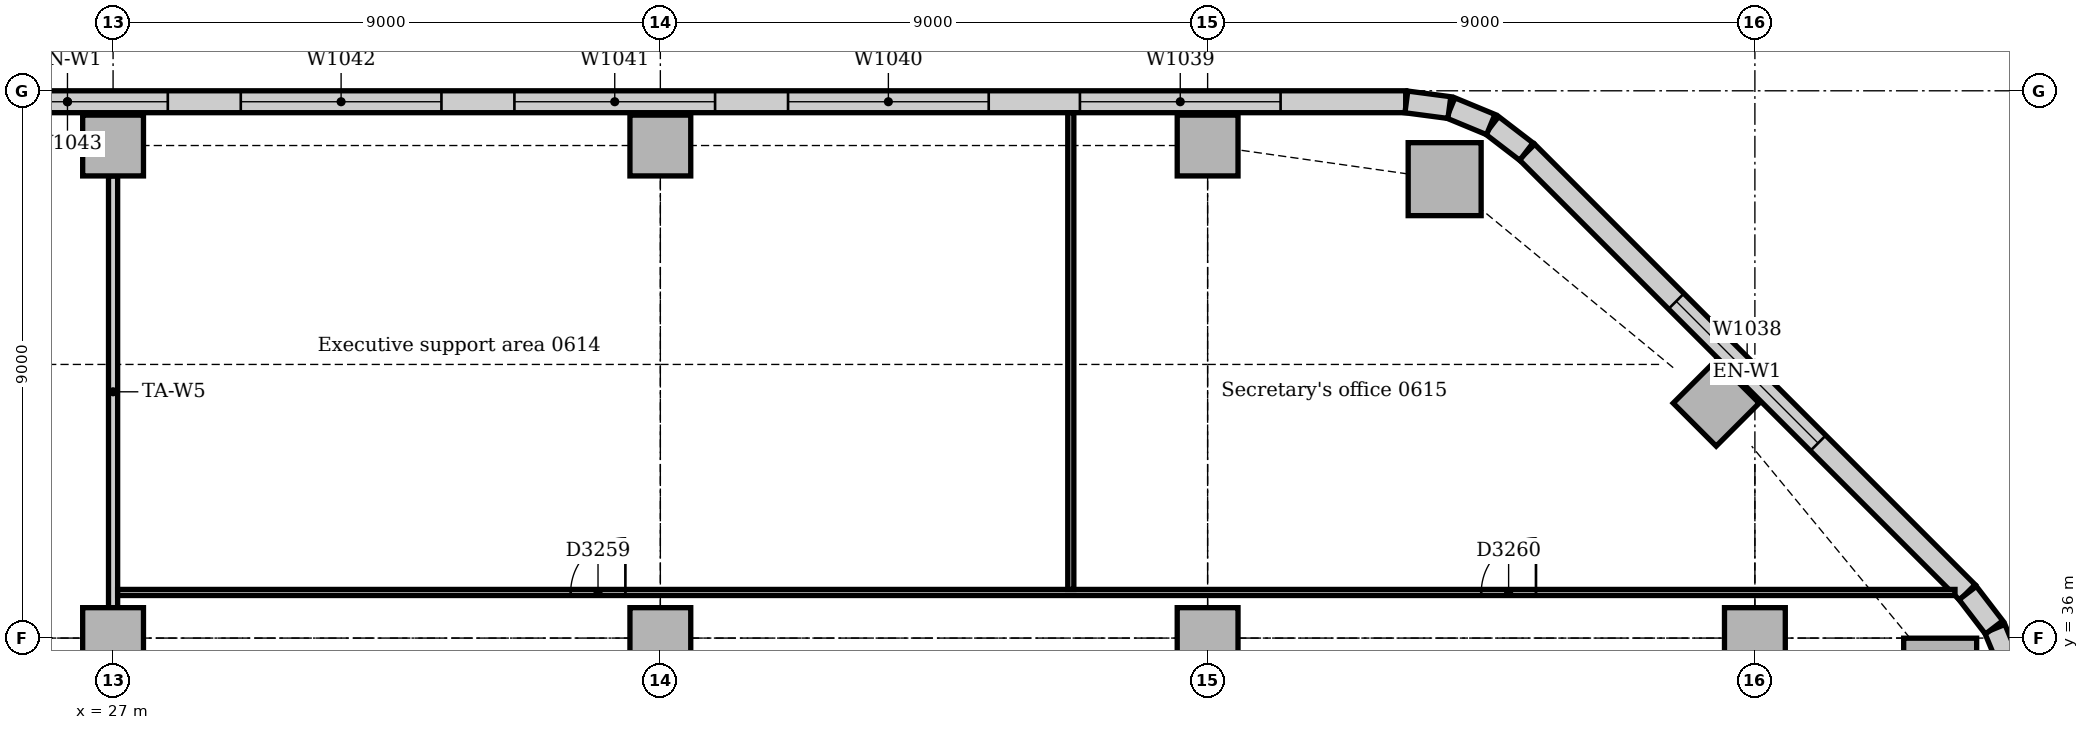
"""IFC4 building model, lengths in metres.
Left out: names, types, materials, properties, quantities, classifications, styles, units other than length and angle.
Written with IfcOpenShell. Run it as: python <this file> out.ifc"""

import sys

from ifc_helpers import new_model, si_unit, direction, frame, frame_2d, origin, origin_2d, place, context, subcontext, project, spatial, rectangle, extrude, element, fill, save


model = new_model("IFC4")
c1 = context("Model", 3, precision=1e-05, world=origin(), true_north=direction((0.0, 1.0)))
c2 = subcontext(c1, "Body", "Model", "MODEL_VIEW")
j1 = project(units=[si_unit("LENGTHUNIT", "METRE"), si_unit("PLANEANGLEUNIT", "RADIAN")], contexts=[c1])
p1 = place(None, origin())
s1 = spatial("IfcSite", under=j1, at=p1, CompositionType="ELEMENT")
p2 = place(p1, origin())
s2 = spatial("IfcBuilding", under=s1, at=p2, CompositionType="ELEMENT")
p3 = place(p2, frame((0.0, 0.0, 30.0)))
s3 = spatial("IfcBuildingStorey", under=s2, at=p3, CompositionType="ELEMENT", Elevation=30.0)
for number, where, z_axis, x_axis in (
    (1, (57.047, 35.398, 0.0), (0.0, 0.0, 1.0), (1.0, 0.0, 0.0)),
    (2, (48.898, 43.547, 0.0), (0.0, 0.0, 1.0), (1.0, 0.0, 0.0)),
):
    element("IfcColumn", number, at=place(p3, frame(where, z_axis=z_axis, x_axis=x_axis)), inside=s3, PredefinedType="COLUMN", context=c2, shape_type="SweptSolid", body=[
        extrude(rectangle(XDim=1.2, YDim=1.2, at=origin_2d()), origin(), (0.0, 0.0, 1.0), 3.85),
    ])
for number, where, z_axis, x_axis in (
    (3, (53.364, 39.864, 0.0), (0.0, 0.0, 1.0), (0.707, 0.707, 0.0)),
    (4, (27.0, 44.1, 0.0), (0.0, 0.0, 1.0), (1.0, 0.0, 0.0)),
    (5, (36.0, 44.1, 0.0), (0.0, 0.0, 1.0), (1.0, 0.0, 0.0)),
    (6, (45.0, 44.1, 0.0), (0.0, 0.0, 1.0), (1.0, 0.0, 0.0)),
    (7, (27.0, 36.0, 0.0), (0.0, 0.0, 1.0), (1.0, 0.0, 0.0)),
    (8, (36.0, 36.0, 0.0), (0.0, 0.0, 1.0), (1.0, 0.0, 0.0)),
    (9, (45.0, 36.0, 0.0), (0.0, 0.0, 1.0), (1.0, 0.0, 0.0)),
    (10, (54.0, 36.0, 0.0), (0.0, 0.0, 1.0), (1.0, 0.0, 0.0)),
):
    element("IfcColumn", number, at=place(p3, frame(where, z_axis=z_axis, x_axis=x_axis)), inside=s3, PredefinedType="COLUMN", context=c2, shape_type="SweptSolid", body=[
        extrude(rectangle(XDim=1.0, YDim=1.0, at=origin_2d()), origin(), (0.0, 0.0, 1.0), 3.85),
    ])
p4 = place(p3, frame((57.494, 36.751, 0.0), z_axis=(0.0, 0.0, 1.0), x_axis=(-0.707106781187, 0.707106781187, 0.0)))
e11 = element("IfcWall", 11, at=p4, inside=s3, PredefinedType="STANDARD", context=c2, shape_type="SweptSolid", body=[
    extrude(rectangle(XDim=10.243, YDim=0.36, at=frame_2d((5.121, 0.0))), origin(), (0.0, 0.0, 1.0), 3.85),
])
p5 = place(p4, frame((3.471, 0.0, 0.9)))
e12 = element("IfcOpeningElement", 12, at=p5, cuts=e11, PredefinedType="OPENING", context=c2, shape_type="SweptSolid", body=[
    extrude(rectangle(XDim=3.3, YDim=1.6, at=frame_2d((1.65, 0.8))), frame((0.0, 0.19, 0.0), z_axis=(0.0, -1.0, 0.0), x_axis=(1.0, 0.0, 0.0)), (0.0, 0.0, 1.0), 0.38),
])
p6 = place(p3, frame((48.257, 44.82, 0.0), z_axis=(0.0, 0.0, 1.0), x_axis=(-1.0, 0.0, 0.0)))
e13 = element("IfcWall", 13, at=p6, inside=s3, PredefinedType="STANDARD", context=c2, shape_type="SweptSolid", body=[
    extrude(rectangle(XDim=44.015, YDim=0.36, at=frame_2d((22.007, 0.0))), origin(), (0.0, 0.0, 1.0), 3.85),
])
p7 = place(p6, frame((2.057, 0.0, 0.9)))
e14 = element("IfcOpeningElement", 14, at=p7, cuts=e13, PredefinedType="OPENING", context=c2, shape_type="SweptSolid", body=[
    extrude(rectangle(XDim=3.3, YDim=1.6, at=frame_2d((1.65, 0.8))), frame((0.0, 0.19, 0.0), z_axis=(0.0, -1.0, 0.0), x_axis=(1.0, 0.0, 0.0)), (0.0, 0.0, 1.0), 0.38),
])
p8 = place(p6, frame((6.857, 0.0, 0.9)))
e15 = element("IfcOpeningElement", 15, at=p8, cuts=e13, PredefinedType="OPENING", context=c2, shape_type="SweptSolid", body=[
    extrude(rectangle(XDim=3.3, YDim=1.6, at=frame_2d((1.65, 0.8))), frame((0.0, 0.19, 0.0), z_axis=(0.0, -1.0, 0.0), x_axis=(1.0, 0.0, 0.0)), (0.0, 0.0, 1.0), 0.38),
])
p9 = place(p6, frame((11.357, 0.0, 0.9)))
e16 = element("IfcOpeningElement", 16, at=p9, cuts=e13, PredefinedType="OPENING", context=c2, shape_type="SweptSolid", body=[
    extrude(rectangle(XDim=3.3, YDim=1.6, at=frame_2d((1.65, 0.8))), frame((0.0, 0.19, 0.0), z_axis=(0.0, -1.0, 0.0), x_axis=(1.0, 0.0, 0.0)), (0.0, 0.0, 1.0), 0.38),
])
p10 = place(p6, frame((15.857, 0.0, 0.9)))
e17 = element("IfcOpeningElement", 17, at=p10, cuts=e13, PredefinedType="OPENING", context=c2, shape_type="SweptSolid", body=[
    extrude(rectangle(XDim=3.3, YDim=1.6, at=frame_2d((1.65, 0.8))), frame((0.0, 0.19, 0.0), z_axis=(0.0, -1.0, 0.0), x_axis=(1.0, 0.0, 0.0)), (0.0, 0.0, 1.0), 0.38),
])
p11 = place(p6, frame((20.357, 0.0, 0.9)))
e18 = element("IfcOpeningElement", 18, at=p11, cuts=e13, PredefinedType="OPENING", context=c2, shape_type="SweptSolid", body=[
    extrude(rectangle(XDim=3.3, YDim=1.6, at=frame_2d((1.65, 0.8))), frame((0.0, 0.19, 0.0), z_axis=(0.0, -1.0, 0.0), x_axis=(1.0, 0.0, 0.0)), (0.0, 0.0, 1.0), 0.38),
])
p12 = place(p6, frame((25.957, 0.0, 0.9)))
e19 = element("IfcOpeningElement", 19, at=p12, cuts=e13, PredefinedType="OPENING", context=c2, shape_type="SweptSolid", body=[
    extrude(rectangle(XDim=1.8, YDim=1.6, at=frame_2d((0.9, 0.8))), frame((0.0, 0.19, 0.0), z_axis=(0.0, -1.0, 0.0), x_axis=(1.0, 0.0, 0.0)), (0.0, 0.0, 1.0), 0.38),
])
p13 = place(p6, frame((29.357, 0.0, 0.9)))
e20 = element("IfcOpeningElement", 20, at=p13, cuts=e13, PredefinedType="OPENING", context=c2, shape_type="SweptSolid", body=[
    extrude(rectangle(XDim=3.3, YDim=1.6, at=frame_2d((1.65, 0.8))), frame((0.0, 0.19, 0.0), z_axis=(0.0, -1.0, 0.0), x_axis=(1.0, 0.0, 0.0)), (0.0, 0.0, 1.0), 0.38),
])
p14 = place(p6, frame((33.857, 0.0, 0.9)))
e21 = element("IfcOpeningElement", 21, at=p14, cuts=e13, PredefinedType="OPENING", context=c2, shape_type="SweptSolid", body=[
    extrude(rectangle(XDim=3.3, YDim=1.6, at=frame_2d((1.65, 0.8))), frame((0.0, 0.19, 0.0), z_axis=(0.0, -1.0, 0.0), x_axis=(1.0, 0.0, 0.0)), (0.0, 0.0, 1.0), 0.38),
])
p15 = place(p6, frame((38.357, 0.0, 0.9)))
e22 = element("IfcOpeningElement", 22, at=p15, cuts=e13, PredefinedType="OPENING", context=c2, shape_type="SweptSolid", body=[
    extrude(rectangle(XDim=3.3, YDim=1.6, at=frame_2d((1.65, 0.8))), frame((0.0, 0.19, 0.0), z_axis=(0.0, -1.0, 0.0), x_axis=(1.0, 0.0, 0.0)), (0.0, 0.0, 1.0), 0.38),
])
p16 = place(p3, frame((58.218, 35.497, 0.0), z_axis=(0.0, 0.0, 1.0), x_axis=(-0.382702709855, 0.923871547278, 0.0)))
e23 = element("IfcWall", 23, at=p16, inside=s3, PredefinedType="STANDARD", context=c2, shape_type="SweptSolid", body=[
    extrude(rectangle(XDim=0.713, YDim=0.36, at=frame_2d((0.356, 0.0))), origin(), (0.0, 0.0, 1.0), 3.85),
])
for number, where, z_axis, x_axis in (
    (24, (57.934, 36.175, 0.0), (0.0, 0.0, 1.0), (-0.609, 0.793, 0.0)),
    (25, (50.241, 44.0, 0.0), (0.0, 0.0, 1.0), (-0.793, 0.609, 0.0)),
):
    element("IfcWall", number, at=place(p3, frame(where, z_axis=z_axis, x_axis=x_axis)), inside=s3, PredefinedType="STANDARD", context=c2, shape_type="SweptSolid", body=[
        extrude(rectangle(XDim=0.713, YDim=0.36, at=frame_2d((0.357, 0.0))), origin(), (0.0, 0.0, 1.0), 3.85),
    ])
for number, where, z_axis, x_axis in (
    (26, (49.656, 44.445, 0.0), (0.0, 0.0, 1.0), (-0.924, 0.383, 0.0)),
    (27, (48.976, 44.724, 0.0), (0.0, 0.0, 1.0), (-0.991, 0.131, 0.0)),
):
    element("IfcWall", number, at=place(p3, frame(where, z_axis=z_axis, x_axis=x_axis)), inside=s3, PredefinedType="STANDARD", context=c2, shape_type="SweptSolid", body=[
        extrude(rectangle(XDim=0.713, YDim=0.36, at=frame_2d((0.356, 0.0))), origin(), (0.0, 0.0, 1.0), 3.85),
    ])
p17 = place(p3, frame((27.0, 36.5, 0.0), z_axis=(0.0, 0.0, 1.0), x_axis=(0.0, 1.0, 0.0)))
e28 = element("IfcWall", 28, at=p17, inside=s3, PredefinedType="PARTITIONING", context=c2, shape_type="SweptSolid", body=[
    extrude(rectangle(XDim=7.1, YDim=0.15, at=frame_2d((3.55, 0.0))), origin(), (0.0, 0.0, 1.0), 3.158),
])
p18 = place(p3, frame((27.075, 36.75, 0.0), z_axis=(0.0, 0.0, 1.0), x_axis=(1.0, 0.0, 0.0)))
e29 = element("IfcWall", 29, at=p18, inside=s3, PredefinedType="PARTITIONING", context=c2, shape_type="SweptSolid", body=[
    extrude(rectangle(XDim=30.216, YDim=0.1, at=frame_2d((15.108, 0.0))), origin(), (0.0, 0.0, 1.0), 3.85),
])
p19 = place(p18, frame((7.45, 0.0, 0.0)))
e30 = element("IfcOpeningElement", 30, at=p19, cuts=e29, PredefinedType="OPENING", context=c2, shape_type="SweptSolid", body=[
    extrude(rectangle(XDim=0.9, YDim=2.1, at=frame_2d((0.45, 1.05))), frame((0.0, 0.06, 0.0), z_axis=(0.0, -1.0, 0.0), x_axis=(1.0, 0.0, 0.0)), (0.0, 0.0, 1.0), 0.12),
])
p20 = place(p18, frame((22.425, 0.0, 0.0)))
e31 = element("IfcOpeningElement", 31, at=p20, cuts=e29, PredefinedType="OPENING", context=c2, shape_type="SweptSolid", body=[
    extrude(rectangle(XDim=0.9, YDim=2.1, at=frame_2d((0.45, 1.05))), frame((0.0, 0.06, 0.0), z_axis=(0.0, -1.0, 0.0), x_axis=(1.0, 0.0, 0.0)), (0.0, 0.0, 1.0), 0.12),
])
p21 = place(p3, frame((42.75, 36.8, 0.0), z_axis=(0.0, 0.0, 1.0), x_axis=(0.0, 1.0, 0.0)))
e32 = element("IfcWall", 32, at=p21, inside=s3, PredefinedType="PARTITIONING", context=c2, shape_type="SweptSolid", body=[
    extrude(rectangle(XDim=7.84, YDim=0.1, at=frame_2d((3.92, 0.0))), origin(), (0.0, 0.0, 1.0), 3.85),
])
p22 = place(p5, origin())
e33 = element("IfcWindow", 33, at=p22, inside=s3, PartitioningType="SINGLE_PANEL", PredefinedType="WINDOW", context=c2, shape_type="SweptSolid", body=[
    extrude(rectangle(XDim=3.3, YDim=1.6, at=frame_2d((1.65, 0.8))), frame((0.0, 0.13, 0.0), z_axis=(0.0, -1.0, 0.0), x_axis=(1.0, 0.0, 0.0)), (0.0, 0.0, 1.0), 0.06),
])
fill(e12, e33)
p23 = place(p7, origin())
e34 = element("IfcWindow", 34, at=p23, inside=s3, PartitioningType="SINGLE_PANEL", PredefinedType="WINDOW", context=c2, shape_type="SweptSolid", body=[
    extrude(rectangle(XDim=3.3, YDim=1.6, at=frame_2d((1.65, 0.8))), frame((0.0, 0.13, 0.0), z_axis=(0.0, -1.0, 0.0), x_axis=(1.0, 0.0, 0.0)), (0.0, 0.0, 1.0), 0.06),
])
fill(e14, e34)
p24 = place(p8, origin())
e35 = element("IfcWindow", 35, at=p24, inside=s3, PartitioningType="SINGLE_PANEL", PredefinedType="WINDOW", context=c2, shape_type="SweptSolid", body=[
    extrude(rectangle(XDim=3.3, YDim=1.6, at=frame_2d((1.65, 0.8))), frame((0.0, 0.13, 0.0), z_axis=(0.0, -1.0, 0.0), x_axis=(1.0, 0.0, 0.0)), (0.0, 0.0, 1.0), 0.06),
])
fill(e15, e35)
p25 = place(p9, origin())
e36 = element("IfcWindow", 36, at=p25, inside=s3, PartitioningType="SINGLE_PANEL", PredefinedType="WINDOW", context=c2, shape_type="SweptSolid", body=[
    extrude(rectangle(XDim=3.3, YDim=1.6, at=frame_2d((1.65, 0.8))), frame((0.0, 0.13, 0.0), z_axis=(0.0, -1.0, 0.0), x_axis=(1.0, 0.0, 0.0)), (0.0, 0.0, 1.0), 0.06),
])
fill(e16, e36)
p26 = place(p10, origin())
e37 = element("IfcWindow", 37, at=p26, inside=s3, PartitioningType="SINGLE_PANEL", PredefinedType="WINDOW", context=c2, shape_type="SweptSolid", body=[
    extrude(rectangle(XDim=3.3, YDim=1.6, at=frame_2d((1.65, 0.8))), frame((0.0, 0.13, 0.0), z_axis=(0.0, -1.0, 0.0), x_axis=(1.0, 0.0, 0.0)), (0.0, 0.0, 1.0), 0.06),
])
fill(e17, e37)
p27 = place(p11, origin())
e38 = element("IfcWindow", 38, at=p27, inside=s3, PartitioningType="SINGLE_PANEL", PredefinedType="WINDOW", context=c2, shape_type="SweptSolid", body=[
    extrude(rectangle(XDim=3.3, YDim=1.6, at=frame_2d((1.65, 0.8))), frame((0.0, 0.13, 0.0), z_axis=(0.0, -1.0, 0.0), x_axis=(1.0, 0.0, 0.0)), (0.0, 0.0, 1.0), 0.06),
])
fill(e18, e38)
p28 = place(p19, origin())
e39 = element("IfcDoor", 39, at=p28, inside=s3, OperationType="SINGLE_SWING_RIGHT", PredefinedType="DOOR", context=c2, shape_type="SweptSolid", body=[
    extrude(rectangle(XDim=0.9, YDim=2.1, at=frame_2d((0.45, 1.05))), frame((0.0, 0.025, 0.0), z_axis=(0.0, -1.0, 0.0), x_axis=(1.0, 0.0, 0.0)), (0.0, 0.0, 1.0), 0.05),
])
fill(e30, e39)
p29 = place(p20, origin())
e40 = element("IfcDoor", 40, at=p29, inside=s3, OperationType="SINGLE_SWING_RIGHT", PredefinedType="DOOR", context=c2, shape_type="SweptSolid", body=[
    extrude(rectangle(XDim=0.9, YDim=2.1, at=frame_2d((0.45, 1.05))), frame((0.0, 0.025, 0.0), z_axis=(0.0, -1.0, 0.0), x_axis=(1.0, 0.0, 0.0)), (0.0, 0.0, 1.0), 0.05),
])
fill(e31, e40)
save(model, sys.argv[1])
